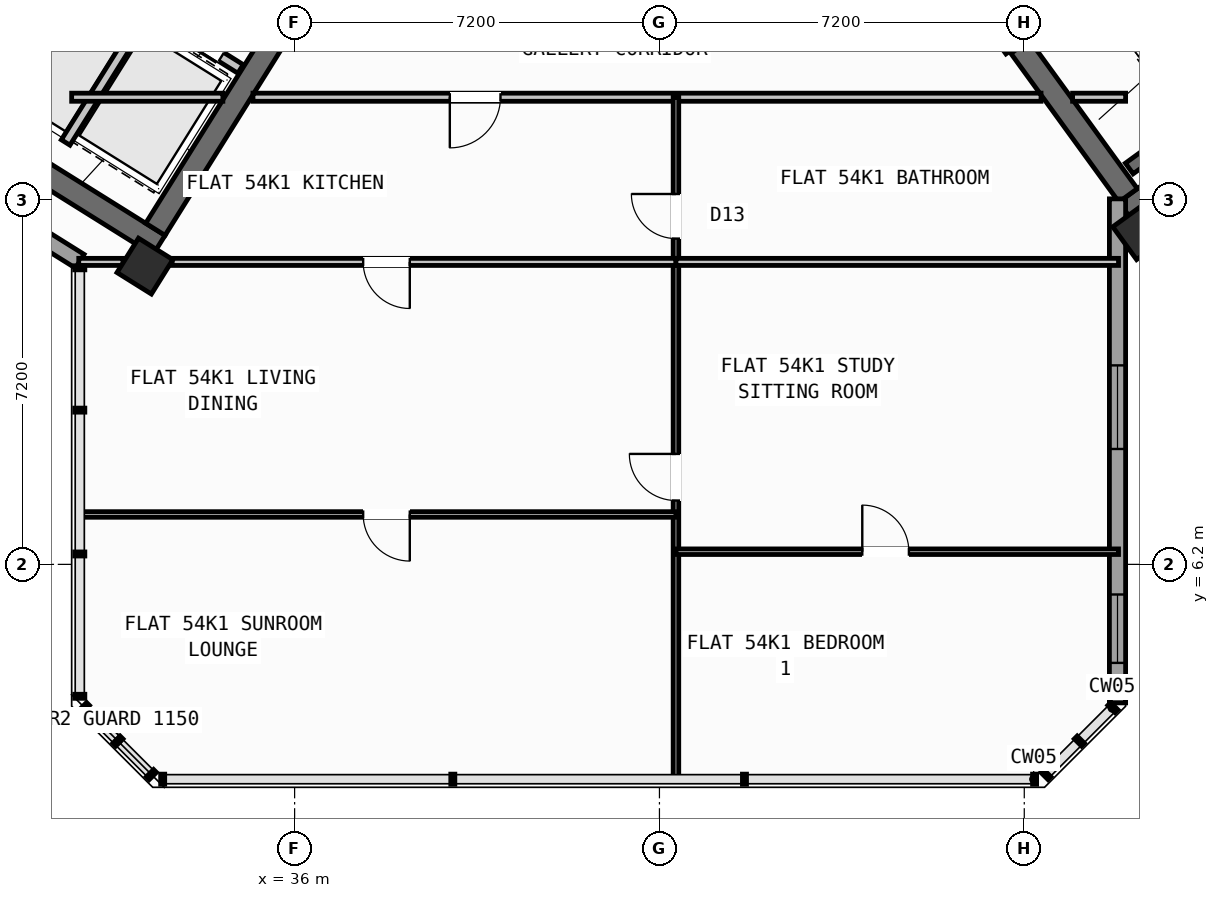
"""IFC4 building model, lengths in metres.
Left out: names, types, materials, properties, quantities, classifications, styles, units other than length and angle.
Written with IfcOpenShell. Run it as: python <this file> out.ifc"""

import sys

from ifc_helpers import new_model, si_unit, direction, frame, frame_2d, origin, origin_2d, place, context, subcontext, project, spatial, rectangle, hollow_rectangle, extrude, source, transform, mapped, element, fill, save


model = new_model("IFC4")
c1 = context("Model", 3, precision=1e-05, world=origin(), true_north=direction((0.0, 1.0)))
c2 = subcontext(c1, "Body", "Model", "MODEL_VIEW")
j1 = project(units=[si_unit("LENGTHUNIT", "METRE"), si_unit("PLANEANGLEUNIT", "RADIAN")], contexts=[c1])
p1 = place(None, origin())
s1 = spatial("IfcSite", under=j1, at=p1, CompositionType="ELEMENT")
p2 = place(p1, origin())
s2 = spatial("IfcBuilding", under=s1, at=p2, CompositionType="ELEMENT")
p3 = place(p2, frame((0.0, 0.0, 214.8)))
s3 = spatial("IfcBuildingStorey", under=s2, at=p3, CompositionType="ELEMENT", Elevation=214.8)
p4 = place(p3, frame((33.324, 12.503, 0.0), z_axis=(0.0, 0.0, 1.0), x_axis=(-0.848043529849, 0.529926571782, 0.0)))
e1 = element("IfcWall", 1, at=p4, inside=s3, PredefinedType="SHEAR", context=c2, shape_type="SweptSolid", body=[
    extrude(rectangle(XDim=13.04, YDim=0.45, at=frame_2d((6.52, 0.0))), origin(), (0.0, 0.0, 1.0), 3.35),
])
p5 = place(p3, frame((36.683, 18.304, 0.0), z_axis=(0.0, 0.0, 1.0), x_axis=(-0.529904039071, -0.848057609704, 0.0)))
e2 = element("IfcWall", 2, at=p5, inside=s3, PredefinedType="SHEAR", context=c2, shape_type="SweptSolid", body=[
    extrude(rectangle(XDim=6.475, YDim=0.45, at=frame_2d((3.238, 0.0))), origin(), (0.0, 0.0, 1.0), 3.35),
])
p6 = place(p3, frame((52.399, 13.169, 0.0), z_axis=(0.0, 0.0, 1.0), x_axis=(0.809022352778, 0.587777877013, 0.0)))
e3 = element("IfcWall", 3, at=p6, inside=s3, PredefinedType="SHEAR", context=c2, shape_type="SweptSolid", body=[
    extrude(rectangle(XDim=12.24, YDim=0.45, at=frame_2d((6.12, 0.0))), origin(), (0.0, 0.0, 1.0), 3.35),
])
p7 = place(p3, frame((52.449, 13.483, 0.0), z_axis=(0.0, 0.0, 1.0), x_axis=(-0.587819244441, 0.808992296542, 0.0)))
e4 = element("IfcWall", 4, at=p7, inside=s3, PredefinedType="SHEAR", context=c2, shape_type="SweptSolid", body=[
    extrude(rectangle(XDim=3.625, YDim=0.45, at=frame_2d((1.812, 0.0))), origin(), (0.0, 0.0, 1.0), 3.35),
])
m1 = source(origin(), c2, "Body", "SweptSolid", [
    extrude(hollow_rectangle(XDim=0.8, YDim=0.8, WallThickness=0.032, at=origin_2d()), origin(), (0.0, 0.0, 1.0), 3.6),
])
for number, where, z_axis, x_axis in (
    (5, (33.046, 12.087, 0.0), (0.0, 0.0, 1.0), (-0.848, 0.53, 0.0)),
    (6, (52.705, 12.773, 0.0), (0.0, 0.0, 1.0), (0.809, 0.588, 0.0)),
):
    element("IfcColumn", number, at=place(p3, frame(where, z_axis=z_axis, x_axis=x_axis)), inside=s3, PredefinedType="COLUMN", context=c2, shape_type="MappedRepresentation", body=[
        mapped(m1, transform((0.0, 0.0, 0.0), scale=1.0)),
    ])
p8 = place(p3, frame((31.76, 12.183, 0.0), z_axis=(0.0, 0.0, 1.0), x_axis=(-0.848047074256, 0.529920899612, 0.0)))
e7 = element("IfcWall", 7, at=p8, inside=s3, PredefinedType="STANDARD", context=c2, shape_type="SweptSolid", body=[
    extrude(rectangle(XDim=30.652, YDim=0.32, at=frame_2d((15.326, 0.0))), origin(), (0.0, 0.0, 1.0), 3.35),
])
p9 = place(p8, frame((15.166, 0.0, 0.0)))
e8 = element("IfcOpeningElement", 8, at=p9, cuts=e7, PredefinedType="OPENING", context=c2, shape_type="SweptSolid", body=[
    extrude(rectangle(XDim=1.2, YDim=2.15, at=frame_2d((0.6, 1.075))), frame((0.0, 0.17, 0.0), z_axis=(0.0, -1.0, 0.0), x_axis=(1.0, 0.0, 0.0)), (0.0, 0.0, 1.0), 0.34),
])
p10 = place(p8, frame((2.24, 0.0, 0.9)))
e9 = element("IfcOpeningElement", 9, at=p10, cuts=e7, PredefinedType="OPENING", context=c2, shape_type="SweptSolid", body=[
    extrude(rectangle(XDim=1.65, YDim=1.45, at=frame_2d((0.825, 0.725))), frame((0.0, 0.17, 0.0), z_axis=(0.0, -1.0, 0.0), x_axis=(1.0, 0.0, 0.0)), (0.0, 0.0, 1.0), 0.34),
])
p11 = place(p8, frame((7.469, 0.0, 0.9)))
e10 = element("IfcOpeningElement", 10, at=p11, cuts=e7, PredefinedType="OPENING", context=c2, shape_type="SweptSolid", body=[
    extrude(rectangle(XDim=1.65, YDim=1.45, at=frame_2d((0.825, 0.725))), frame((0.0, 0.17, 0.0), z_axis=(0.0, -1.0, 0.0), x_axis=(1.0, 0.0, 0.0)), (0.0, 0.0, 1.0), 0.34),
])
p12 = place(p8, frame((12.623, 0.0, 1.0)))
e11 = element("IfcOpeningElement", 11, at=p12, cuts=e7, PredefinedType="OPENING", context=c2, shape_type="SweptSolid", body=[
    extrude(rectangle(XDim=0.9, YDim=1.25, at=frame_2d((0.45, 0.625))), frame((0.0, 0.17, 0.0), z_axis=(0.0, -1.0, 0.0), x_axis=(1.0, 0.0, 0.0)), (0.0, 0.0, 1.0), 0.34),
])
p13 = place(p8, frame((19.715, 0.0, 1.0)))
e12 = element("IfcOpeningElement", 12, at=p13, cuts=e7, PredefinedType="OPENING", context=c2, shape_type="SweptSolid", body=[
    extrude(rectangle(XDim=0.9, YDim=1.25, at=frame_2d((0.45, 0.625))), frame((0.0, 0.17, 0.0), z_axis=(0.0, -1.0, 0.0), x_axis=(1.0, 0.0, 0.0)), (0.0, 0.0, 1.0), 0.34),
])
p14 = place(p8, frame((25.566, 0.0, 0.9)))
e13 = element("IfcOpeningElement", 13, at=p14, cuts=e7, PredefinedType="OPENING", context=c2, shape_type="SweptSolid", body=[
    extrude(rectangle(XDim=1.65, YDim=1.45, at=frame_2d((0.825, 0.725))), frame((0.0, 0.17, 0.0), z_axis=(0.0, -1.0, 0.0), x_axis=(1.0, 0.0, 0.0)), (0.0, 0.0, 1.0), 0.34),
])
p15 = place(p8, frame((28.896, 0.0, 1.0)))
e14 = element("IfcOpeningElement", 14, at=p15, cuts=e7, PredefinedType="OPENING", context=c2, shape_type="SweptSolid", body=[
    extrude(rectangle(XDim=0.9, YDim=1.25, at=frame_2d((0.45, 0.625))), frame((0.0, 0.17, 0.0), z_axis=(0.0, -1.0, 0.0), x_axis=(1.0, 0.0, 0.0)), (0.0, 0.0, 1.0), 0.34),
])
p16 = place(p3, frame((52.24, 13.414, 0.0), z_axis=(0.0, 0.0, 1.0), x_axis=(0.0, -1.0, 0.0)))
e15 = element("IfcWall", 15, at=p16, inside=s3, PredefinedType="STANDARD", context=c2, shape_type="SweptSolid", body=[
    extrude(rectangle(XDim=9.948, YDim=0.32, at=frame_2d((4.974, 0.0))), origin(), (0.0, 0.0, 1.0), 3.35),
])
p17 = place(p16, frame((3.287, 0.0, 0.9)))
e16 = element("IfcOpeningElement", 16, at=p17, cuts=e15, PredefinedType="OPENING", context=c2, shape_type="SweptSolid", body=[
    extrude(rectangle(XDim=1.65, YDim=1.45, at=frame_2d((0.825, 0.725))), frame((0.0, 0.17, 0.0), z_axis=(0.0, -1.0, 0.0), x_axis=(1.0, 0.0, 0.0)), (0.0, 0.0, 1.0), 0.34),
])
p18 = place(p16, frame((7.808, 0.0, 0.9)))
e17 = element("IfcOpeningElement", 17, at=p18, cuts=e15, PredefinedType="OPENING", context=c2, shape_type="SweptSolid", body=[
    extrude(rectangle(XDim=1.35, YDim=1.45, at=frame_2d((0.675, 0.725))), frame((0.0, 0.17, 0.0), z_axis=(0.0, -1.0, 0.0), x_axis=(1.0, 0.0, 0.0)), (0.0, 0.0, 1.0), 0.34),
])
p19 = place(p3, frame((31.288, 18.256, 0.0), z_axis=(0.0, 0.0, 1.0), x_axis=(-0.529943379326, -0.848033026897, 0.0)))
e18 = element("IfcWall", 18, at=p19, inside=s3, PredefinedType="SHEAR", context=c2, shape_type="SweptSolid", body=[
    extrude(rectangle(XDim=3.16, YDim=0.26, at=frame_2d((1.58, 0.0))), origin(), (0.0, 0.0, 1.0), 3.35),
])
p20 = place(p3, frame((34.933, 15.978, 0.0), z_axis=(0.0, 0.0, 1.0), x_axis=(-0.848055739377, 0.529907032327, 0.0)))
e19 = element("IfcWall", 19, at=p20, inside=s3, PredefinedType="STANDARD", context=c2, shape_type="SweptSolid", body=[
    extrude(rectangle(XDim=4.298, YDim=0.2, at=frame_2d((2.149, 0.0))), origin(), (0.0, 0.0, 1.0), 3.34),
])
p21 = place(p20, frame((0.448, 0.0, 0.0)))
e20 = element("IfcOpeningElement", 20, at=p21, cuts=e19, PredefinedType="OPENING", context=c2, shape_type="SweptSolid", body=[
    extrude(rectangle(XDim=1.3, YDim=2.2, at=frame_2d((0.65, 1.1))), frame((0.0, 0.11, 0.0), z_axis=(0.0, -1.0, 0.0), x_axis=(1.0, 0.0, 0.0)), (0.0, 0.0, 1.0), 0.22),
])
p22 = place(p20, frame((2.523, 0.0, 0.0)))
e21 = element("IfcOpeningElement", 21, at=p22, cuts=e19, PredefinedType="OPENING", context=c2, shape_type="SweptSolid", body=[
    extrude(rectangle(XDim=1.45, YDim=2.25, at=frame_2d((0.725, 1.125))), frame((0.0, 0.11, 0.0), z_axis=(0.0, -1.0, 0.0), x_axis=(1.0, 0.0, 0.0)), (0.0, 0.0, 1.0), 0.22),
])
p23 = place(p3, frame((33.029, 17.003, 0.0), z_axis=(0.0, 0.0, 1.0), x_axis=(-0.529916267533, -0.848049968695, 0.0)))
e22 = element("IfcWall", 22, at=p23, inside=s3, PredefinedType="STANDARD", context=c2, shape_type="SweptSolid", body=[
    extrude(rectangle(XDim=2.92, YDim=0.2, at=frame_2d((1.46, 0.0))), origin(), (0.0, 0.0, 1.0), 3.34),
])
p24 = place(p3, frame((52.472, 14.013, 0.0), z_axis=(0.0, 0.0, 1.0), x_axis=(0.809028366311, 0.587769599847, 0.0)))
e23 = element("IfcWall", 23, at=p24, inside=s3, PredefinedType="SHEAR", context=c2, shape_type="SweptSolid", body=[
    extrude(rectangle(XDim=7.33, YDim=0.26, at=frame_2d((3.665, 0.0))), origin(), (0.0, 0.0, 1.0), 3.35),
])
p25 = place(p3, frame((31.6, 15.42, 0.0), z_axis=(0.0, 0.0, 1.0), x_axis=(1.0, 0.0, 0.0)))
e24 = element("IfcWall", 24, at=p25, inside=s3, PredefinedType="PARTITIONING", context=c2, shape_type="SweptSolid", body=[
    extrude(rectangle(XDim=2.984, YDim=0.16, at=frame_2d((1.492, 0.0))), origin(), (0.0, 0.0, 1.0), 3.34),
])
p26 = place(p3, frame((35.178, 15.42, 0.0), z_axis=(0.0, 0.0, 1.0), x_axis=(1.0, 0.0, 0.0)))
e25 = element("IfcWall", 25, at=p26, inside=s3, PredefinedType="PARTITIONING", context=c2, shape_type="SweptSolid", body=[
    extrude(rectangle(XDim=15.552, YDim=0.16, at=frame_2d((7.776, 0.0))), origin(), (0.0, 0.0, 1.0), 3.34),
])
p27 = place(p26, frame((3.885, 0.0, 0.0)))
e26 = element("IfcOpeningElement", 26, at=p27, cuts=e25, PredefinedType="OPENING", context=c2, shape_type="SweptSolid", body=[
    extrude(rectangle(XDim=1.0, YDim=2.1, at=frame_2d((0.5, 1.05))), frame((0.0, 0.09, 0.0), z_axis=(0.0, -1.0, 0.0), x_axis=(1.0, 0.0, 0.0)), (0.0, 0.0, 1.0), 0.18),
])
p28 = place(p3, frame((51.354, 15.42, 0.0), z_axis=(0.0, 0.0, 1.0), x_axis=(1.0, 0.0, 0.0)))
e27 = element("IfcWall", 27, at=p28, inside=s3, PredefinedType="PARTITIONING", context=c2, shape_type="SweptSolid", body=[
    extrude(rectangle(XDim=1.046, YDim=0.16, at=frame_2d((0.523, 0.0))), origin(), (0.0, 0.0, 1.0), 3.34),
])
p29 = place(p3, frame((50.119, 16.333, 0.0), z_axis=(0.0, 0.0, 1.0), x_axis=(-0.587749856981, 0.809042709391, 0.0)))
e28 = element("IfcWall", 28, at=p29, inside=s3, PredefinedType="STANDARD", context=c2, shape_type="SweptSolid", body=[
    extrude(rectangle(XDim=2.96, YDim=0.2, at=frame_2d((1.48, 0.0))), origin(), (0.0, 0.0, 1.0), 3.34),
])
p30 = place(p29, frame((0.53, 0.0, 0.0)))
e29 = element("IfcOpeningElement", 29, at=p30, cuts=e28, PredefinedType="OPENING", context=c2, shape_type="SweptSolid", body=[
    extrude(rectangle(XDim=1.5, YDim=2.15, at=frame_2d((0.75, 1.075))), frame((0.0, 0.11, 0.0), z_axis=(0.0, -1.0, 0.0), x_axis=(1.0, 0.0, 0.0)), (0.0, 0.0, 1.0), 0.22),
])
p31 = place(p3, frame((43.526, 1.96, 0.0), z_axis=(0.0, 0.0, 1.0), x_axis=(0.0, 1.0, 0.0)))
e30 = element("IfcWall", 30, at=p31, inside=s3, PredefinedType="PARTITIONING", context=c2, shape_type="SweptSolid", body=[
    extrude(rectangle(XDim=13.46, YDim=0.11, at=frame_2d((6.73, 0.0))), origin(), (0.0, 0.0, 1.0), 3.34),
])
p32 = place(p31, frame((5.5, 0.0, 0.0)))
e31 = element("IfcOpeningElement", 31, at=p32, cuts=e30, PredefinedType="OPENING", context=c2, shape_type="SweptSolid", body=[
    extrude(rectangle(XDim=0.92, YDim=2.08, at=frame_2d((0.46, 1.04))), frame((0.0, 0.065, 0.0), z_axis=(0.0, -1.0, 0.0), x_axis=(1.0, 0.0, 0.0)), (0.0, 0.0, 1.0), 0.13),
])
p33 = place(p31, frame((10.67, 0.0, 0.0)))
e32 = element("IfcOpeningElement", 32, at=p33, cuts=e30, PredefinedType="OPENING", context=c2, shape_type="SweptSolid", body=[
    extrude(rectangle(XDim=0.88, YDim=2.08, at=frame_2d((0.44, 1.04))), frame((0.0, 0.065, 0.0), z_axis=(0.0, -1.0, 0.0), x_axis=(1.0, 0.0, 0.0)), (0.0, 0.0, 1.0), 0.13),
])
p34 = place(p3, frame((31.74, 12.17, 0.0), z_axis=(0.0, 0.0, 1.0), x_axis=(1.0, 0.0, 0.0)))
e33 = element("IfcWall", 33, at=p34, inside=s3, PredefinedType="PLUMBINGWALL", context=c2, shape_type="SweptSolid", body=[
    extrude(rectangle(XDim=0.872, YDim=0.14, at=frame_2d((0.436, 0.0))), origin(), (0.0, 0.0, 1.0), 3.34),
])
p35 = place(p3, frame((33.584, 12.17, 0.0), z_axis=(0.0, 0.0, 1.0), x_axis=(1.0, 0.0, 0.0)))
e34 = element("IfcWall", 34, at=p35, inside=s3, PredefinedType="PLUMBINGWALL", context=c2, shape_type="SweptSolid", body=[
    extrude(rectangle(XDim=9.942, YDim=0.14, at=frame_2d((4.971, 0.0))), origin(), (0.0, 0.0, 1.0), 2.525),
])
p36 = place(p35, frame((3.769, 0.0, 0.0)))
e35 = element("IfcOpeningElement", 35, at=p36, cuts=e34, PredefinedType="OPENING", context=c2, shape_type="SweptSolid", body=[
    extrude(rectangle(XDim=0.92, YDim=2.08, at=frame_2d((0.46, 1.04))), frame((0.0, 0.08, 0.0), z_axis=(0.0, -1.0, 0.0), x_axis=(1.0, 0.0, 0.0)), (0.0, 0.0, 1.0), 0.16),
])
p37 = place(p3, frame((43.526, 12.17, 0.0), z_axis=(0.0, 0.0, 1.0), x_axis=(1.0, 0.0, 0.0)))
e36 = element("IfcWall", 36, at=p37, inside=s3, PredefinedType="PLUMBINGWALL", context=c2, shape_type="SweptSolid", body=[
    extrude(rectangle(XDim=8.734, YDim=0.14, at=frame_2d((4.367, 0.0))), origin(), (0.0, 0.0, 1.0), 2.525),
])
p38 = place(p3, frame((31.74, 7.185, 0.0), z_axis=(0.0, 0.0, 1.0), x_axis=(1.0, 0.0, 0.0)))
e37 = element("IfcWall", 37, at=p38, inside=s3, PredefinedType="PARTITIONING", context=c2, shape_type="SweptSolid", body=[
    extrude(rectangle(XDim=11.786, YDim=0.11, at=frame_2d((5.893, 0.0))), origin(), (0.0, 0.0, 1.0), 3.34),
])
p39 = place(p38, frame((5.613, 0.0, 0.0)))
e38 = element("IfcOpeningElement", 38, at=p39, cuts=e37, PredefinedType="OPENING", context=c2, shape_type="SweptSolid", body=[
    extrude(rectangle(XDim=0.92, YDim=2.08, at=frame_2d((0.46, 1.04))), frame((0.0, 0.065, 0.0), z_axis=(0.0, -1.0, 0.0), x_axis=(1.0, 0.0, 0.0)), (0.0, 0.0, 1.0), 0.13),
])
p40 = place(p3, frame((43.526, 6.45, 0.0), z_axis=(0.0, 0.0, 1.0), x_axis=(1.0, 0.0, 0.0)))
e39 = element("IfcWall", 39, at=p40, inside=s3, PredefinedType="PARTITIONING", context=c2, shape_type="SweptSolid", body=[
    extrude(rectangle(XDim=8.734, YDim=0.11, at=frame_2d((4.367, 0.0))), origin(), (0.0, 0.0, 1.0), 3.34),
])
p41 = place(p40, frame((3.677, 0.0, 0.0)))
e40 = element("IfcOpeningElement", 40, at=p41, cuts=e39, PredefinedType="OPENING", context=c2, shape_type="SweptSolid", body=[
    extrude(rectangle(XDim=0.92, YDim=2.08, at=frame_2d((0.46, 1.04))), frame((0.0, 0.065, 0.0), z_axis=(0.0, -1.0, 0.0), x_axis=(1.0, 0.0, 0.0)), (0.0, 0.0, 1.0), 0.13),
])
m2 = source(origin(), c2, "Body", "SweptSolid", [
    extrude(rectangle(XDim=1.65, YDim=1.45, at=frame_2d((0.825, 0.725))), frame((0.0, 0.03, 0.0), z_axis=(0.0, -1.0, 0.0), x_axis=(1.0, 0.0, 0.0)), (0.0, 0.0, 1.0), 0.06),
])
p42 = place(p17, origin())
e41 = element("IfcWindow", 41, at=p42, inside=s3, PartitioningType="SINGLE_PANEL", PredefinedType="WINDOW", context=c2, shape_type="MappedRepresentation", body=[
    mapped(m2, transform((0.0, 0.0, 0.0), scale=1.0)),
])
fill(e16, e41)
m3 = source(origin(), c2, "Body", "SweptSolid", [
    extrude(rectangle(XDim=1.35, YDim=1.45, at=frame_2d((0.675, 0.725))), frame((0.0, 0.03, 0.0), z_axis=(0.0, -1.0, 0.0), x_axis=(1.0, 0.0, 0.0)), (0.0, 0.0, 1.0), 0.06),
])
p43 = place(p18, origin())
e42 = element("IfcWindow", 42, at=p43, inside=s3, PartitioningType="SINGLE_PANEL", PredefinedType="WINDOW", context=c2, shape_type="MappedRepresentation", body=[
    mapped(m3, transform((0.0, 0.0, 0.0), scale=1.0)),
])
fill(e17, e42)
m4 = source(origin(), c2, "Body", "SweptSolid", [
    extrude(rectangle(XDim=1.3, YDim=2.2, at=frame_2d((0.65, 1.1))), frame((0.0, 0.025, 0.0), z_axis=(0.0, -1.0, 0.0), x_axis=(1.0, 0.0, 0.0)), (0.0, 0.0, 1.0), 0.05),
])
p44 = place(p21, origin())
e43 = element("IfcDoor", 43, at=p44, inside=s3, OperationType="DOUBLE_DOOR_SLIDING", PredefinedType="DOOR", context=c2, shape_type="MappedRepresentation", body=[
    mapped(m4, transform((0.0, 0.0, 0.0), scale=1.0)),
])
fill(e20, e43)
m5 = source(origin(), c2, "Body", "SweptSolid", [
    extrude(rectangle(XDim=0.92, YDim=2.08, at=frame_2d((0.46, 1.04))), frame((0.0, 0.025, 0.0), z_axis=(0.0, -1.0, 0.0), x_axis=(1.0, 0.0, 0.0)), (0.0, 0.0, 1.0), 0.05),
])
p45 = place(p39, frame((0.92, 0.0, 0.0), z_axis=(0.0, 0.0, 1.0), x_axis=(-1.0, 0.0, 0.0)))
e44 = element("IfcDoor", 44, at=p45, inside=s3, OperationType="SINGLE_SWING_LEFT", PredefinedType="DOOR", context=c2, shape_type="MappedRepresentation", body=[
    mapped(m5, transform((0.0, 0.0, 0.0), scale=1.0)),
])
fill(e38, e44)
p46 = place(p32, origin())
e45 = element("IfcDoor", 45, at=p46, inside=s3, OperationType="SINGLE_SWING_RIGHT", PredefinedType="DOOR", context=c2, shape_type="MappedRepresentation", body=[
    mapped(m5, transform((0.0, 0.0, 0.0), scale=1.0)),
])
fill(e31, e45)
p47 = place(p41, origin())
e46 = element("IfcDoor", 46, at=p47, inside=s3, OperationType="SINGLE_SWING_LEFT", PredefinedType="DOOR", context=c2, shape_type="MappedRepresentation", body=[
    mapped(m5, transform((0.0, 0.0, 0.0), scale=1.0)),
])
fill(e40, e46)
m6 = source(origin(), c2, "Body", "SweptSolid", [
    extrude(rectangle(XDim=1.0, YDim=2.1, at=frame_2d((0.5, 1.05))), frame((0.0, 0.025, 0.0), z_axis=(0.0, -1.0, 0.0), x_axis=(1.0, 0.0, 0.0)), (0.0, 0.0, 1.0), 0.05),
])
p48 = place(p27, frame((1.0, 0.0, 0.0), z_axis=(0.0, 0.0, 1.0), x_axis=(-1.0, 0.0, 0.0)))
e47 = element("IfcDoor", 47, at=p48, inside=s3, OperationType="SINGLE_SWING_RIGHT", PredefinedType="DOOR", context=c2, shape_type="MappedRepresentation", body=[
    mapped(m6, transform((0.0, 0.0, 0.0), scale=1.0)),
])
fill(e26, e47)
p49 = place(p36, frame((0.92, 0.0, 0.0), z_axis=(0.0, 0.0, 1.0), x_axis=(-1.0, 0.0, 0.0)))
e48 = element("IfcDoor", 48, at=p49, inside=s3, OperationType="SINGLE_SWING_LEFT", PredefinedType="DOOR", context=c2, shape_type="MappedRepresentation", body=[
    mapped(m5, transform((0.0, 0.0, 0.0), scale=1.0)),
])
fill(e35, e48)
m7 = source(origin(), c2, "Body", "SweptSolid", [
    extrude(rectangle(XDim=0.88, YDim=2.08, at=frame_2d((0.44, 1.04))), frame((0.0, 0.025, 0.0), z_axis=(0.0, -1.0, 0.0), x_axis=(1.0, 0.0, 0.0)), (0.0, 0.0, 1.0), 0.05),
])
p50 = place(p33, origin())
e49 = element("IfcDoor", 49, at=p50, inside=s3, OperationType="SINGLE_SWING_RIGHT", PredefinedType="DOOR", context=c2, shape_type="MappedRepresentation", body=[
    mapped(m7, transform((0.0, 0.0, 0.0), scale=1.0)),
])
fill(e32, e49)
save(model, sys.argv[1])
